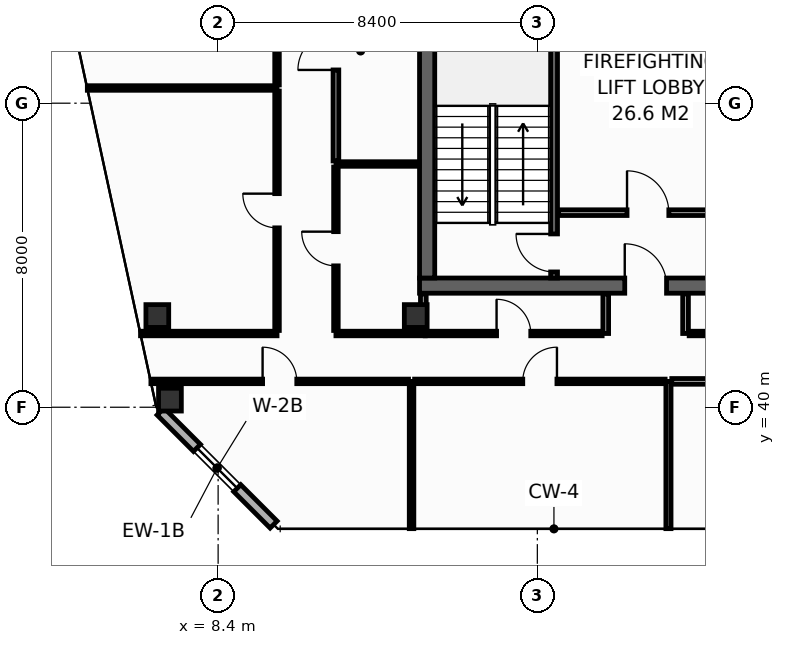
"""IFC4 building model, lengths in metres.
Left out: names, types, materials, properties, quantities, classifications, styles, units other than length and angle.
Written with IfcOpenShell. Run it as: python <this file> out.ifc"""

import sys

from ifc_helpers import new_model, si_unit, direction, frame, frame_2d, origin, origin_2d, place, context, subcontext, project, spatial, rectangle, hollow_rectangle, extrude, element, fill, save


model = new_model("IFC4")
c1 = context("Model", 3, precision=1e-05, world=origin(), true_north=direction((0.0, 1.0)))
c2 = subcontext(c1, "Body", "Model", "MODEL_VIEW")
j1 = project(units=[si_unit("LENGTHUNIT", "METRE"), si_unit("PLANEANGLEUNIT", "RADIAN")], contexts=[c1])
p1 = place(None, origin())
s1 = spatial("IfcSite", under=j1, at=p1, CompositionType="ELEMENT")
p2 = place(p1, origin())
s2 = spatial("IfcBuilding", under=s1, at=p2, CompositionType="ELEMENT")
p3 = place(p2, frame((0.0, 0.0, 319.2)))
s3 = spatial("IfcBuildingStorey", under=s2, at=p3, CompositionType="ELEMENT", Elevation=319.2)
p4 = place(p3, frame((13.7, 43.2, 0.0), z_axis=(0.0, 0.0, 1.0), x_axis=(1.0, 0.0, 0.0)))
e1 = element("IfcWall", 1, at=p4, inside=s3, PredefinedType="SHEAR", context=c2, shape_type="SweptSolid", body=[
    extrude(rectangle(XDim=32.5, YDim=0.4, at=frame_2d((16.25, 0.0))), origin(), (0.0, 0.0, 1.0), 3.95),
])
p5 = place(p4, frame((5.4, 0.0, 0.0)))
e2 = element("IfcOpeningElement", 2, at=p5, cuts=e1, PredefinedType="OPENING", context=c2, shape_type="SweptSolid", body=[
    extrude(rectangle(XDim=1.1, YDim=2.15, at=frame_2d((0.55, 1.075))), frame((0.0, 0.21, 0.0), z_axis=(0.0, -1.0, 0.0), x_axis=(1.0, 0.0, 0.0)), (0.0, 0.0, 1.0), 0.42),
])
p6 = place(p4, frame((25.6, 0.0, 0.0)))
e3 = element("IfcOpeningElement", 3, at=p6, cuts=e1, PredefinedType="OPENING", context=c2, shape_type="SweptSolid", body=[
    extrude(rectangle(XDim=1.1, YDim=2.15, at=frame_2d((0.55, 1.075))), frame((0.0, 0.21, 0.0), z_axis=(0.0, -1.0, 0.0), x_axis=(1.0, 0.0, 0.0)), (0.0, 0.0, 1.0), 0.42),
])
p7 = place(p3, frame((13.9, 43.4, 0.0), z_axis=(0.0, 0.0, 1.0), x_axis=(0.0, 1.0, 0.0)))
e4 = element("IfcWall", 4, at=p7, inside=s3, PredefinedType="SHEAR", context=c2, shape_type="SweptSolid", body=[
    extrude(rectangle(XDim=10.4, YDim=0.4, at=frame_2d((5.2, 0.0))), origin(), (0.0, 0.0, 1.0), 3.95),
])
for number, where, z_axis, x_axis in (
    (5, (6.8, 42.4, 0.0), (0.0, 0.0, 1.0), (1.0, 0.0, 0.0)),
    (6, (13.6, 42.4, 0.0), (0.0, 0.0, 1.0), (1.0, 0.0, 0.0)),
    (7, (7.132, 40.2, 0.0), (0.0, 0.0, 1.0), (1.0, 0.0, 0.0)),
):
    element("IfcColumn", number, at=place(p3, frame(where, z_axis=z_axis, x_axis=x_axis)), inside=s3, PredefinedType="COLUMN", context=c2, shape_type="SweptSolid", body=[
        extrude(hollow_rectangle(XDim=0.6, YDim=0.6, WallThickness=0.028, at=origin_2d()), origin(), (0.0, 0.0, 1.0), 4.2),
    ])
p8 = place(p3, frame((17.24, 43.4, 0.0), z_axis=(0.0, 0.0, 1.0), x_axis=(0.0, 1.0, 0.0)))
e8 = element("IfcWall", 8, at=p8, inside=s3, PredefinedType="SHEAR", context=c2, shape_type="SweptSolid", body=[
    extrude(rectangle(XDim=10.4, YDim=0.18, at=frame_2d((5.2, 0.0))), origin(), (0.0, 0.0, 1.0), 3.95),
])
p9 = place(p8, frame((0.16, 0.0, 0.0)))
e9 = element("IfcOpeningElement", 9, at=p9, cuts=e8, PredefinedType="OPENING", context=c2, shape_type="SweptSolid", body=[
    extrude(rectangle(XDim=1.0, YDim=2.15, at=frame_2d((0.5, 1.075))), frame((0.0, 0.1, 0.0), z_axis=(0.0, -1.0, 0.0), x_axis=(1.0, 0.0, 0.0)), (0.0, 0.0, 1.0), 0.2),
])
p10 = place(p3, frame((17.36, 45.12, 0.0), z_axis=(0.0, 0.0, 1.0), x_axis=(1.0, 0.0, 0.0)))
e10 = element("IfcWall", 10, at=p10, inside=s3, PredefinedType="PARTITIONING", context=c2, shape_type="SweptSolid", body=[
    extrude(rectangle(XDim=5.14, YDim=0.15, at=frame_2d((2.57, 0.0))), origin(), (0.0, 0.0, 1.0), 3.95),
])
p11 = place(p10, frame((1.8, 0.0, 0.0)))
e11 = element("IfcOpeningElement", 11, at=p11, cuts=e10, PredefinedType="OPENING", context=c2, shape_type="SweptSolid", body=[
    extrude(rectangle(XDim=1.1, YDim=2.15, at=frame_2d((0.55, 1.075))), frame((0.0, 0.085, 0.0), z_axis=(0.0, -1.0, 0.0), x_axis=(1.0, 0.0, 0.0)), (0.0, 0.0, 1.0), 0.17),
])
p12 = place(p3, frame((6.886, 39.887, 0.0), z_axis=(0.0, 0.0, 1.0), x_axis=(0.70707775441, -0.707135806771, 0.0)))
e12 = element("IfcWall", 12, at=p12, inside=s3, PredefinedType="STANDARD", context=c2, shape_type="SweptSolid", body=[
    extrude(rectangle(XDim=4.206, YDim=0.26, at=frame_2d((2.103, 0.0))), origin(), (0.0, 0.0, 1.0), 3.95),
])
p13 = place(p12, frame((1.353, 0.0, 0.9)))
e13 = element("IfcOpeningElement", 13, at=p13, cuts=e12, PredefinedType="OPENING", context=c2, shape_type="SweptSolid", body=[
    extrude(rectangle(XDim=1.5, YDim=1.85, at=frame_2d((0.75, 0.925))), frame((0.0, 0.14, 0.0), z_axis=(0.0, -1.0, 0.0), x_axis=(1.0, 0.0, 0.0)), (0.0, 0.0, 1.0), 0.28),
])
p14 = place(p3, frame((6.358, 41.94, 0.0), z_axis=(0.0, 0.0, 1.0), x_axis=(1.0, 0.0, 0.0)))
e14 = element("IfcWall", 14, at=p14, inside=s3, PredefinedType="PARTITIONING", context=c2, shape_type="SweptSolid", body=[
    extrude(rectangle(XDim=3.592, YDim=0.12, at=frame_2d((1.796, 0.0))), origin(), (0.0, 0.0, 1.0), 3.485),
])
p15 = place(p3, frame((11.5, 41.94, 0.0), z_axis=(0.0, 0.0, 1.0), x_axis=(1.0, 0.0, 0.0)))
e15 = element("IfcWall", 15, at=p15, inside=s3, PredefinedType="PARTITIONING", context=c2, shape_type="SweptSolid", body=[
    extrude(rectangle(XDim=2.35, YDim=0.12, at=frame_2d((1.175, 0.0))), origin(), (0.0, 0.0, 1.0), 3.95),
])
p16 = place(p3, frame((4.958, 48.4, 0.0), z_axis=(0.0, 0.0, 1.0), x_axis=(1.0, 0.0, 0.0)))
e16 = element("IfcWall", 16, at=p16, inside=s3, PredefinedType="PARTITIONING", context=c2, shape_type="SweptSolid", body=[
    extrude(rectangle(XDim=4.991, YDim=0.12, at=frame_2d((2.496, 0.0))), origin(), (0.0, 0.0, 1.0), 3.347),
])
p17 = place(p3, frame((9.95, 42.02, 0.0), z_axis=(0.0, 0.0, 1.0), x_axis=(0.0, 1.0, 0.0)))
e17 = element("IfcWall", 17, at=p17, inside=s3, PredefinedType="PARTITIONING", context=c2, shape_type="SweptSolid", body=[
    extrude(rectangle(XDim=6.3, YDim=0.12, at=frame_2d((3.15, 0.0))), origin(), (0.0, 0.0, 1.0), 3.347),
])
p18 = place(p17, frame((2.7, 0.0, 0.0)))
e18 = element("IfcOpeningElement", 18, at=p18, cuts=e17, PredefinedType="OPENING", context=c2, shape_type="SweptSolid", body=[
    extrude(rectangle(XDim=0.9, YDim=2.1, at=frame_2d((0.45, 1.05))), frame((0.0, 0.07, 0.0), z_axis=(0.0, -1.0, 0.0), x_axis=(1.0, 0.0, 0.0)), (0.0, 0.0, 1.0), 0.14),
])
p19 = place(p3, frame((9.95, 48.48, 0.0), z_axis=(0.0, 0.0, 1.0), x_axis=(0.0, 1.0, 0.0)))
e19 = element("IfcWall", 19, at=p19, inside=s3, PredefinedType="PARTITIONING", context=c2, shape_type="SweptSolid", body=[
    extrude(rectangle(XDim=7.515, YDim=0.12, at=frame_2d((3.758, 0.0))), origin(), (0.0, 0.0, 1.0), 3.335),
])
p20 = place(p19, frame((3.308, 0.0, 0.0)))
e20 = element("IfcOpeningElement", 20, at=p20, cuts=e19, PredefinedType="OPENING", context=c2, shape_type="SweptSolid", body=[
    extrude(rectangle(XDim=0.9, YDim=2.1, at=frame_2d((0.45, 1.05))), frame((0.0, 0.07, 0.0), z_axis=(0.0, -1.0, 0.0), x_axis=(1.0, 0.0, 0.0)), (0.0, 0.0, 1.0), 0.14),
])
p21 = place(p3, frame((11.5, 46.4, 0.0), z_axis=(0.0, 0.0, 1.0), x_axis=(1.0, 0.0, 0.0)))
e21 = element("IfcWall", 21, at=p21, inside=s3, PredefinedType="PARTITIONING", context=c2, shape_type="SweptSolid", body=[
    extrude(rectangle(XDim=2.18, YDim=0.12, at=frame_2d((1.09, 0.0))), origin(), (0.0, 0.0, 1.0), 3.95),
])
p22 = place(p3, frame((11.5, 42.02, 0.0), z_axis=(0.0, 0.0, 1.0), x_axis=(0.0, 1.0, 0.0)))
e22 = element("IfcWall", 22, at=p22, inside=s3, PredefinedType="PARTITIONING", context=c2, shape_type="SweptSolid", body=[
    extrude(rectangle(XDim=4.3, YDim=0.12, at=frame_2d((2.15, 0.0))), origin(), (0.0, 0.0, 1.0), 3.347),
])
p23 = place(p22, frame((1.7, 0.0, 0.0)))
e23 = element("IfcOpeningElement", 23, at=p23, cuts=e22, PredefinedType="OPENING", context=c2, shape_type="SweptSolid", body=[
    extrude(rectangle(XDim=0.9, YDim=2.1, at=frame_2d((0.45, 1.05))), frame((0.0, 0.07, 0.0), z_axis=(0.0, -1.0, 0.0), x_axis=(1.0, 0.0, 0.0)), (0.0, 0.0, 1.0), 0.14),
])
p24 = place(p3, frame((11.5, 46.48, 0.0), z_axis=(0.0, 0.0, 1.0), x_axis=(0.0, 1.0, 0.0)))
e24 = element("IfcWall", 24, at=p24, inside=s3, PredefinedType="PARTITIONING", context=c2, shape_type="SweptSolid", body=[
    extrude(rectangle(XDim=5.79, YDim=0.15, at=frame_2d((2.895, 0.0))), origin(), (0.0, 0.0, 1.0), 3.95),
])
p25 = place(p24, frame((2.395, 0.0, 0.0)))
e25 = element("IfcOpeningElement", 25, at=p25, cuts=e24, PredefinedType="OPENING", context=c2, shape_type="SweptSolid", body=[
    extrude(rectangle(XDim=1.0, YDim=2.15, at=frame_2d((0.5, 1.075))), frame((0.0, 0.085, 0.0), z_axis=(0.0, -1.0, 0.0), x_axis=(1.0, 0.0, 0.0)), (0.0, 0.0, 1.0), 0.17),
])
p26 = place(p3, frame((13.8, 42.02, 0.0), z_axis=(0.0, 0.0, 1.0), x_axis=(0.0, 1.0, 0.0)))
e26 = element("IfcWall", 26, at=p26, inside=s3, PredefinedType="PARTITIONING", context=c2, shape_type="SweptSolid", body=[
    extrude(rectangle(XDim=0.96, YDim=0.15, at=frame_2d((0.48, 0.0))), origin(), (0.0, 0.0, 1.0), 3.95),
])
for number, where, z_axis, x_axis in (
    (27, (18.6, 41.94, 0.0), (0.0, 0.0, 1.0), (0.0, 1.0, 0.0)),
    (28, (20.7, 41.94, 0.0), (0.0, 0.0, 1.0), (0.0, 1.0, 0.0)),
):
    element("IfcWall", number, at=place(p3, frame(where, z_axis=z_axis, x_axis=x_axis)), inside=s3, PredefinedType="PARTITIONING", context=c2, shape_type="SweptSolid", body=[
        extrude(rectangle(XDim=1.04, YDim=0.15, at=frame_2d((0.52, 0.0))), origin(), (0.0, 0.0, 1.0), 3.95),
    ])
p27 = place(p3, frame((13.85, 41.94, 0.0), z_axis=(0.0, 0.0, 1.0), x_axis=(1.0, 0.0, 0.0)))
e29 = element("IfcWall", 29, at=p27, inside=s3, PredefinedType="PARTITIONING", context=c2, shape_type="SweptSolid", body=[
    extrude(rectangle(XDim=4.655, YDim=0.12, at=frame_2d((2.327, 0.0))), origin(), (0.0, 0.0, 1.0), 3.95),
])
p28 = place(p27, frame((1.877, 0.0, 0.0)))
e30 = element("IfcOpeningElement", 30, at=p28, cuts=e29, PredefinedType="OPENING", context=c2, shape_type="SweptSolid", body=[
    extrude(rectangle(XDim=0.9, YDim=2.1, at=frame_2d((0.45, 1.05))), frame((0.0, 0.07, 0.0), z_axis=(0.0, -1.0, 0.0), x_axis=(1.0, 0.0, 0.0)), (0.0, 0.0, 1.0), 0.14),
])
p29 = place(p3, frame((20.795, 41.94, 0.0), z_axis=(0.0, 0.0, 1.0), x_axis=(1.0, 0.0, 0.0)))
e31 = element("IfcWall", 31, at=p29, inside=s3, PredefinedType="PARTITIONING", context=c2, shape_type="SweptSolid", body=[
    extrude(rectangle(XDim=9.125, YDim=0.12, at=frame_2d((4.562, 0.0))), origin(), (0.0, 0.0, 1.0), 3.95),
])
p30 = place(p29, frame((4.112, 0.0, 0.0)))
e32 = element("IfcOpeningElement", 32, at=p30, cuts=e31, PredefinedType="OPENING", context=c2, shape_type="SweptSolid", body=[
    extrude(rectangle(XDim=0.9, YDim=2.1, at=frame_2d((0.45, 1.05))), frame((0.0, 0.07, 0.0), z_axis=(0.0, -1.0, 0.0), x_axis=(1.0, 0.0, 0.0)), (0.0, 0.0, 1.0), 0.14),
])
p31 = place(p3, frame((13.49, 36.805, 0.0), z_axis=(0.0, 0.0, 1.0), x_axis=(0.0, 1.0, 0.0)))
e33 = element("IfcWall", 33, at=p31, inside=s3, PredefinedType="PARTITIONING", context=c2, shape_type="SweptSolid", body=[
    extrude(rectangle(XDim=3.875, YDim=0.12, at=frame_2d((1.938, 0.0))), origin(), (0.0, 0.0, 1.0), 3.95),
])
p32 = place(p3, frame((20.25, 36.805, 0.0), z_axis=(0.0, 0.0, 1.0), x_axis=(0.0, 1.0, 0.0)))
e34 = element("IfcWall", 34, at=p32, inside=s3, PredefinedType="PARTITIONING", context=c2, shape_type="SweptSolid", body=[
    extrude(rectangle(XDim=3.875, YDim=0.135, at=frame_2d((1.938, 0.0))), origin(), (0.0, 0.0, 1.0), 3.95),
])
p33 = place(p3, frame((6.631, 40.68, 0.0), z_axis=(0.0, 0.0, 1.0), x_axis=(1.0, 0.0, 0.0)))
e35 = element("IfcWall", 35, at=p33, inside=s3, PredefinedType="PARTITIONING", context=c2, shape_type="SweptSolid", body=[
    extrude(rectangle(XDim=6.779, YDim=0.12, at=frame_2d((3.389, 0.0))), origin(), (0.0, 0.0, 1.0), 3.485),
])
p34 = place(p33, frame((2.939, 0.0, 0.0)))
e36 = element("IfcOpeningElement", 36, at=p34, cuts=e35, PredefinedType="OPENING", context=c2, shape_type="SweptSolid", body=[
    extrude(rectangle(XDim=0.9, YDim=2.1, at=frame_2d((0.45, 1.05))), frame((0.0, 0.07, 0.0), z_axis=(0.0, -1.0, 0.0), x_axis=(1.0, 0.0, 0.0)), (0.0, 0.0, 1.0), 0.14),
])
p35 = place(p3, frame((13.57, 40.68, 0.0), z_axis=(0.0, 0.0, 1.0), x_axis=(1.0, 0.0, 0.0)))
e37 = element("IfcWall", 37, at=p35, inside=s3, PredefinedType="PARTITIONING", context=c2, shape_type="SweptSolid", body=[
    extrude(rectangle(XDim=6.593, YDim=0.12, at=frame_2d((3.296, 0.0))), origin(), (0.0, 0.0, 1.0), 3.95),
])
p36 = place(p35, frame((2.846, 0.0, 0.0)))
e38 = element("IfcOpeningElement", 38, at=p36, cuts=e37, PredefinedType="OPENING", context=c2, shape_type="SweptSolid", body=[
    extrude(rectangle(XDim=0.9, YDim=2.1, at=frame_2d((0.45, 1.05))), frame((0.0, 0.07, 0.0), z_axis=(0.0, -1.0, 0.0), x_axis=(1.0, 0.0, 0.0)), (0.0, 0.0, 1.0), 0.14),
])
p37 = place(p3, frame((20.337, 40.68, 0.0), z_axis=(0.0, 0.0, 1.0), x_axis=(1.0, 0.0, 0.0)))
e39 = element("IfcWall", 39, at=p37, inside=s3, PredefinedType="PARTITIONING", context=c2, shape_type="SweptSolid", body=[
    extrude(rectangle(XDim=7.693, YDim=0.15, at=frame_2d((3.846, 0.0))), origin(), (0.0, 0.0, 1.0), 3.95),
])
p38 = place(p37, frame((3.346, 0.0, 0.0)))
e40 = element("IfcOpeningElement", 40, at=p38, cuts=e39, PredefinedType="OPENING", context=c2, shape_type="SweptSolid", body=[
    extrude(rectangle(XDim=1.0, YDim=2.15, at=frame_2d((0.5, 1.075))), frame((0.0, 0.085, 0.0), z_axis=(0.0, -1.0, 0.0), x_axis=(1.0, 0.0, 0.0)), (0.0, 0.0, 1.0), 0.17),
])
p39 = place(p9, origin())
e41 = element("IfcDoor", 41, at=p39, inside=s3, OperationType="SINGLE_SWING_RIGHT", PredefinedType="DOOR", context=c2, shape_type="SweptSolid", body=[
    extrude(rectangle(XDim=1.0, YDim=2.15, at=frame_2d((0.5, 1.075))), frame((0.0, 0.025, 0.0), z_axis=(0.0, -1.0, 0.0), x_axis=(1.0, 0.0, 0.0)), (0.0, 0.0, 1.0), 0.05),
])
fill(e9, e41)
p40 = place(p11, origin())
e42 = element("IfcDoor", 42, at=p40, inside=s3, OperationType="SINGLE_SWING_LEFT", PredefinedType="DOOR", context=c2, shape_type="SweptSolid", body=[
    extrude(rectangle(XDim=1.1, YDim=2.15, at=frame_2d((0.55, 1.075))), frame((0.0, 0.025, 0.0), z_axis=(0.0, -1.0, 0.0), x_axis=(1.0, 0.0, 0.0)), (0.0, 0.0, 1.0), 0.05),
])
fill(e11, e42)
p41 = place(p5, origin())
e43 = element("IfcDoor", 43, at=p41, inside=s3, OperationType="SINGLE_SWING_LEFT", PredefinedType="DOOR", context=c2, shape_type="SweptSolid", body=[
    extrude(rectangle(XDim=1.1, YDim=2.15, at=frame_2d((0.55, 1.075))), frame((0.0, 0.025, 0.0), z_axis=(0.0, -1.0, 0.0), x_axis=(1.0, 0.0, 0.0)), (0.0, 0.0, 1.0), 0.05),
])
fill(e2, e43)
p42 = place(p13, origin())
e44 = element("IfcWindow", 44, at=p42, inside=s3, PartitioningType="SINGLE_PANEL", PredefinedType="WINDOW", context=c2, shape_type="SweptSolid", body=[
    extrude(rectangle(XDim=1.5, YDim=1.85, at=frame_2d((0.75, 0.925))), frame((0.0, 0.03, 0.0), z_axis=(0.0, -1.0, 0.0), x_axis=(1.0, 0.0, 0.0)), (0.0, 0.0, 1.0), 0.06),
])
fill(e13, e44)
p43 = place(p18, origin())
e45 = element("IfcDoor", 45, at=p43, inside=s3, OperationType="SINGLE_SWING_RIGHT", PredefinedType="DOOR", context=c2, shape_type="SweptSolid", body=[
    extrude(rectangle(XDim=0.9, YDim=2.1, at=frame_2d((0.45, 1.05))), frame((0.0, 0.025, 0.0), z_axis=(0.0, -1.0, 0.0), x_axis=(1.0, 0.0, 0.0)), (0.0, 0.0, 1.0), 0.05),
])
fill(e18, e45)
p44 = place(p23, origin())
e46 = element("IfcDoor", 46, at=p44, inside=s3, OperationType="SINGLE_SWING_RIGHT", PredefinedType="DOOR", context=c2, shape_type="SweptSolid", body=[
    extrude(rectangle(XDim=0.9, YDim=2.1, at=frame_2d((0.45, 1.05))), frame((0.0, 0.025, 0.0), z_axis=(0.0, -1.0, 0.0), x_axis=(1.0, 0.0, 0.0)), (0.0, 0.0, 1.0), 0.05),
])
fill(e23, e46)
p45 = place(p25, origin())
e47 = element("IfcDoor", 47, at=p45, inside=s3, OperationType="SINGLE_SWING_LEFT", PredefinedType="DOOR", context=c2, shape_type="SweptSolid", body=[
    extrude(rectangle(XDim=1.0, YDim=2.15, at=frame_2d((0.5, 1.075))), frame((0.0, 0.025, 0.0), z_axis=(0.0, -1.0, 0.0), x_axis=(1.0, 0.0, 0.0)), (0.0, 0.0, 1.0), 0.05),
])
fill(e25, e47)
p46 = place(p28, origin())
e48 = element("IfcDoor", 48, at=p46, inside=s3, OperationType="SINGLE_SWING_LEFT", PredefinedType="DOOR", context=c2, shape_type="SweptSolid", body=[
    extrude(rectangle(XDim=0.9, YDim=2.1, at=frame_2d((0.45, 1.05))), frame((0.0, 0.025, 0.0), z_axis=(0.0, -1.0, 0.0), x_axis=(1.0, 0.0, 0.0)), (0.0, 0.0, 1.0), 0.05),
])
fill(e30, e48)
p47 = place(p34, origin())
e49 = element("IfcDoor", 49, at=p47, inside=s3, OperationType="SINGLE_SWING_LEFT", PredefinedType="DOOR", context=c2, shape_type="SweptSolid", body=[
    extrude(rectangle(XDim=0.9, YDim=2.1, at=frame_2d((0.45, 1.05))), frame((0.0, 0.025, 0.0), z_axis=(0.0, -1.0, 0.0), x_axis=(1.0, 0.0, 0.0)), (0.0, 0.0, 1.0), 0.05),
])
fill(e36, e49)
p48 = place(p36, origin())
e50 = element("IfcDoor", 50, at=p48, inside=s3, OperationType="SINGLE_SWING_RIGHT", PredefinedType="DOOR", context=c2, shape_type="SweptSolid", body=[
    extrude(rectangle(XDim=0.9, YDim=2.1, at=frame_2d((0.45, 1.05))), frame((0.0, 0.025, 0.0), z_axis=(0.0, -1.0, 0.0), x_axis=(1.0, 0.0, 0.0)), (0.0, 0.0, 1.0), 0.05),
])
fill(e38, e50)
save(model, sys.argv[1])
